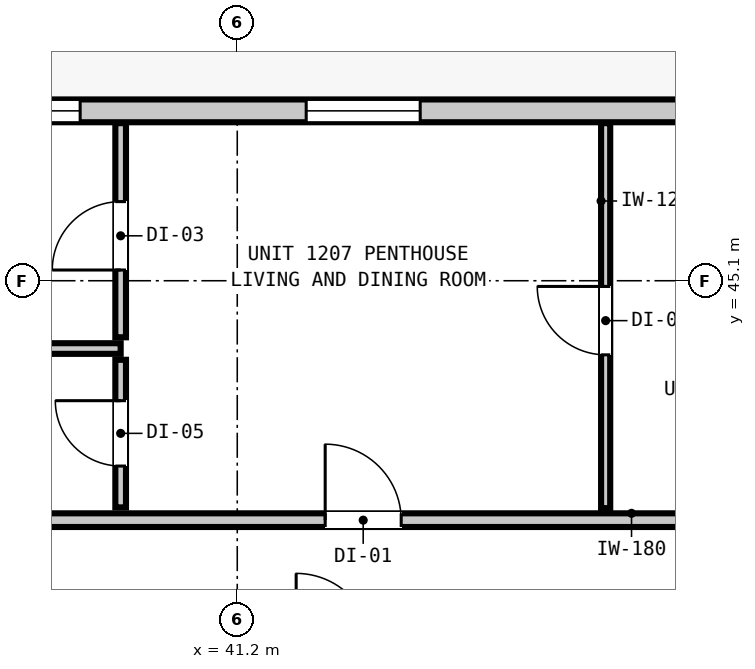
"""IFC4 building model, lengths in metres.
Left out: names, types, materials, properties, quantities, classifications, styles, units other than length and angle.
Written with IfcOpenShell. Run it as: python <this file> out.ifc"""

import sys

from ifc_helpers import new_model, si_unit, direction, frame, frame_2d, origin, place, context, subcontext, project, spatial, rectangle, extrude, element, fill, save


model = new_model("IFC4")
c1 = context("Model", 3, precision=1e-05, world=origin(), true_north=direction((0.0, 1.0)))
c2 = subcontext(c1, "Body", "Model", "MODEL_VIEW")
j1 = project(units=[si_unit("LENGTHUNIT", "METRE"), si_unit("PLANEANGLEUNIT", "RADIAN")], contexts=[c1])
p1 = place(None, origin())
s1 = spatial("IfcSite", under=j1, at=p1, CompositionType="ELEMENT")
p2 = place(p1, origin())
s2 = spatial("IfcBuilding", under=s1, at=p2, CompositionType="ELEMENT")
p3 = place(p2, frame((0.0, 0.0, 45.24)))
s3 = spatial("IfcBuildingStorey", under=s2, at=p3, CompositionType="ELEMENT", Elevation=45.24)
p4 = place(p3, frame((10.365, 47.335, 0.0), z_axis=(0.0, 0.0, 1.0), x_axis=(1.0, 0.0, 0.0)))
e1 = element("IfcWall", 1, at=p4, inside=s3, PredefinedType="STANDARD", context=c2, shape_type="SweptSolid", body=[
    extrude(rectangle(XDim=37.47, YDim=0.3, at=frame_2d((18.735, 0.0))), origin(), (0.0, 0.0, 1.0), 3.06),
])
p5 = place(p4, frame((4.403, 0.0, 0.0)))
e2 = element("IfcOpeningElement", 2, at=p5, cuts=e1, PredefinedType="OPENING", context=c2, shape_type="SweptSolid", body=[
    extrude(rectangle(XDim=1.0, YDim=2.15, at=frame_2d((0.5, 1.075))), frame((0.0, 0.16, 0.0), z_axis=(0.0, -1.0, 0.0), x_axis=(1.0, 0.0, 0.0)), (0.0, 0.0, 1.0), 0.32),
])
p6 = place(p4, frame((5.814, 0.0, 0.85)))
e3 = element("IfcOpeningElement", 3, at=p6, cuts=e1, PredefinedType="OPENING", context=c2, shape_type="SweptSolid", body=[
    extrude(rectangle(XDim=0.58, YDim=1.5, at=frame_2d((0.29, 0.75))), frame((0.0, 0.16, 0.0), z_axis=(0.0, -1.0, 0.0), x_axis=(1.0, 0.0, 0.0)), (0.0, 0.0, 1.0), 0.32),
])
p7 = place(p4, frame((0.462, 0.0, 0.85)))
e4 = element("IfcOpeningElement", 4, at=p7, cuts=e1, PredefinedType="OPENING", context=c2, shape_type="SweptSolid", body=[
    extrude(rectangle(XDim=1.5, YDim=1.8, at=frame_2d((0.75, 0.9))), frame((0.0, 0.16, 0.0), z_axis=(0.0, -1.0, 0.0), x_axis=(1.0, 0.0, 0.0)), (0.0, 0.0, 1.0), 0.32),
])
p8 = place(p4, frame((13.885, 0.0, 0.85)))
e5 = element("IfcOpeningElement", 5, at=p8, cuts=e1, PredefinedType="OPENING", context=c2, shape_type="SweptSolid", body=[
    extrude(rectangle(XDim=1.5, YDim=1.8, at=frame_2d((0.75, 0.9))), frame((0.0, 0.16, 0.0), z_axis=(0.0, -1.0, 0.0), x_axis=(1.0, 0.0, 0.0)), (0.0, 0.0, 1.0), 0.32),
])
p9 = place(p4, frame((31.742, 0.0, 0.85)))
e6 = element("IfcOpeningElement", 6, at=p9, cuts=e1, PredefinedType="OPENING", context=c2, shape_type="SweptSolid", body=[
    extrude(rectangle(XDim=1.5, YDim=1.8, at=frame_2d((0.75, 0.9))), frame((0.0, 0.16, 0.0), z_axis=(0.0, -1.0, 0.0), x_axis=(1.0, 0.0, 0.0)), (0.0, 0.0, 1.0), 0.32),
])
p10 = place(p4, frame((27.268, 0.0, 0.85)))
e7 = element("IfcOpeningElement", 7, at=p10, cuts=e1, PredefinedType="OPENING", context=c2, shape_type="SweptSolid", body=[
    extrude(rectangle(XDim=1.5, YDim=1.8, at=frame_2d((0.75, 0.9))), frame((0.0, 0.16, 0.0), z_axis=(0.0, -1.0, 0.0), x_axis=(1.0, 0.0, 0.0)), (0.0, 0.0, 1.0), 0.32),
])
p11 = place(p3, frame((36.932, 41.95, 0.0), z_axis=(0.0, 0.0, 1.0), x_axis=(1.0, 0.0, 0.0)))
e8 = element("IfcWall", 8, at=p11, inside=s3, PredefinedType="PARTITIONING", context=c2, shape_type="SweptSolid", body=[
    extrude(rectangle(XDim=12.386, YDim=0.18, at=frame_2d((6.193, 0.0))), origin(), (0.0, 0.0, 1.0), 2.445),
])
p12 = place(p11, frame((5.425, 0.0, 0.0)))
e9 = element("IfcOpeningElement", 9, at=p12, cuts=e8, PredefinedType="OPENING", context=c2, shape_type="SweptSolid", body=[
    extrude(rectangle(XDim=1.0, YDim=2.15, at=frame_2d((0.5, 1.075))), frame((0.0, 0.1, 0.0), z_axis=(0.0, -1.0, 0.0), x_axis=(1.0, 0.0, 0.0)), (0.0, 0.0, 1.0), 0.2),
])
p13 = place(p3, frame((31.82, 44.208, 0.0), z_axis=(0.0, 0.0, 1.0), x_axis=(1.0, 0.0, 0.0)))
e10 = element("IfcWall", 10, at=p13, inside=s3, PredefinedType="PARTITIONING", context=c2, shape_type="SweptSolid", body=[
    extrude(rectangle(XDim=7.846, YDim=0.14, at=frame_2d((3.923, 0.0))), origin(), (0.0, 0.0, 1.0), 3.06),
])
p14 = place(p3, frame((39.666, 42.118, 0.0), z_axis=(0.0, 0.0, 1.0), x_axis=(0.0, 1.0, 0.0)))
e11 = element("IfcWall", 11, at=p14, inside=s3, PredefinedType="PARTITIONING", context=c2, shape_type="SweptSolid", body=[
    extrude(rectangle(XDim=1.942, YDim=0.14, at=frame_2d((0.971, 0.0))), origin(), (0.0, 0.0, 1.0), 3.06),
])
p15 = place(p14, frame((0.544, 0.0, 0.0)))
e12 = element("IfcOpeningElement", 12, at=p15, cuts=e11, PredefinedType="OPENING", context=c2, shape_type="SweptSolid", body=[
    extrude(rectangle(XDim=0.86, YDim=2.02, at=frame_2d((0.43, 1.01))), frame((0.0, 0.08, 0.0), z_axis=(0.0, -1.0, 0.0), x_axis=(1.0, 0.0, 0.0)), (0.0, 0.0, 1.0), 0.16),
])
p16 = place(p3, frame((39.666, 44.356, 0.0), z_axis=(0.0, 0.0, 1.0), x_axis=(0.0, 1.0, 0.0)))
e13 = element("IfcWall", 13, at=p16, inside=s3, PredefinedType="PARTITIONING", context=c2, shape_type="SweptSolid", body=[
    extrude(rectangle(XDim=2.817, YDim=0.14, at=frame_2d((1.409, 0.0))), origin(), (0.0, 0.0, 1.0), 3.06),
])
p17 = place(p16, frame((0.885, 0.0, 0.0)))
e14 = element("IfcOpeningElement", 14, at=p17, cuts=e13, PredefinedType="OPENING", context=c2, shape_type="SweptSolid", body=[
    extrude(rectangle(XDim=0.9, YDim=2.1, at=frame_2d((0.45, 1.05))), frame((0.0, 0.08, 0.0), z_axis=(0.0, -1.0, 0.0), x_axis=(1.0, 0.0, 0.0)), (0.0, 0.0, 1.0), 0.16),
])
p18 = place(p3, frame((46.047, 42.108, 0.0), z_axis=(0.0, 0.0, 1.0), x_axis=(0.0, 1.0, 0.0)))
e15 = element("IfcWall", 15, at=p18, inside=s3, PredefinedType="PARTITIONING", context=c2, shape_type="SweptSolid", body=[
    extrude(rectangle(XDim=5.065, YDim=0.12, at=frame_2d((2.533, 0.0))), origin(), (0.0, 0.0, 1.0), 3.06),
])
p19 = place(p18, frame((2.017, 0.0, 0.0)))
e16 = element("IfcOpeningElement", 16, at=p19, cuts=e15, PredefinedType="OPENING", context=c2, shape_type="SweptSolid", body=[
    extrude(rectangle(XDim=0.9, YDim=2.1, at=frame_2d((0.45, 1.05))), frame((0.0, 0.07, 0.0), z_axis=(0.0, -1.0, 0.0), x_axis=(1.0, 0.0, 0.0)), (0.0, 0.0, 1.0), 0.14),
])
p20 = place(p9, origin())
e17 = element("IfcWindow", 17, at=p20, inside=s3, PartitioningType="SINGLE_PANEL", PredefinedType="WINDOW", context=c2, shape_type="SweptSolid", body=[
    extrude(rectangle(XDim=1.5, YDim=1.8, at=frame_2d((0.75, 0.9))), frame((0.0, 0.03, 0.0), z_axis=(0.0, -1.0, 0.0), x_axis=(1.0, 0.0, 0.0)), (0.0, 0.0, 1.0), 0.06),
])
fill(e6, e17)
p21 = place(p10, origin())
e18 = element("IfcWindow", 18, at=p21, inside=s3, PartitioningType="SINGLE_PANEL", PredefinedType="WINDOW", context=c2, shape_type="SweptSolid", body=[
    extrude(rectangle(XDim=1.5, YDim=1.8, at=frame_2d((0.75, 0.9))), frame((0.0, 0.03, 0.0), z_axis=(0.0, -1.0, 0.0), x_axis=(1.0, 0.0, 0.0)), (0.0, 0.0, 1.0), 0.06),
])
fill(e7, e18)
p22 = place(p12, origin())
e19 = element("IfcDoor", 19, at=p22, inside=s3, OperationType="SINGLE_SWING_LEFT", PredefinedType="DOOR", context=c2, shape_type="SweptSolid", body=[
    extrude(rectangle(XDim=1.0, YDim=2.15, at=frame_2d((0.5, 1.075))), frame((0.0, 0.025, 0.0), z_axis=(0.0, -1.0, 0.0), x_axis=(1.0, 0.0, 0.0)), (0.0, 0.0, 1.0), 0.05),
])
fill(e9, e19)
p23 = place(p15, origin())
e20 = element("IfcDoor", 20, at=p23, inside=s3, OperationType="SINGLE_SWING_RIGHT", PredefinedType="DOOR", context=c2, shape_type="SweptSolid", body=[
    extrude(rectangle(XDim=0.86, YDim=2.02, at=frame_2d((0.43, 1.01))), frame((0.0, 0.025, 0.0), z_axis=(0.0, -1.0, 0.0), x_axis=(1.0, 0.0, 0.0)), (0.0, 0.0, 1.0), 0.05),
])
fill(e12, e20)
p24 = place(p17, origin())
e21 = element("IfcDoor", 21, at=p24, inside=s3, OperationType="SINGLE_SWING_LEFT", PredefinedType="DOOR", context=c2, shape_type="SweptSolid", body=[
    extrude(rectangle(XDim=0.9, YDim=2.1, at=frame_2d((0.45, 1.05))), frame((0.0, 0.025, 0.0), z_axis=(0.0, -1.0, 0.0), x_axis=(1.0, 0.0, 0.0)), (0.0, 0.0, 1.0), 0.05),
])
fill(e14, e21)
p25 = place(p19, origin())
e22 = element("IfcDoor", 22, at=p25, inside=s3, OperationType="SINGLE_SWING_RIGHT", PredefinedType="DOOR", context=c2, shape_type="SweptSolid", body=[
    extrude(rectangle(XDim=0.9, YDim=2.1, at=frame_2d((0.45, 1.05))), frame((0.0, 0.025, 0.0), z_axis=(0.0, -1.0, 0.0), x_axis=(1.0, 0.0, 0.0)), (0.0, 0.0, 1.0), 0.05),
])
fill(e16, e22)
save(model, sys.argv[1])
